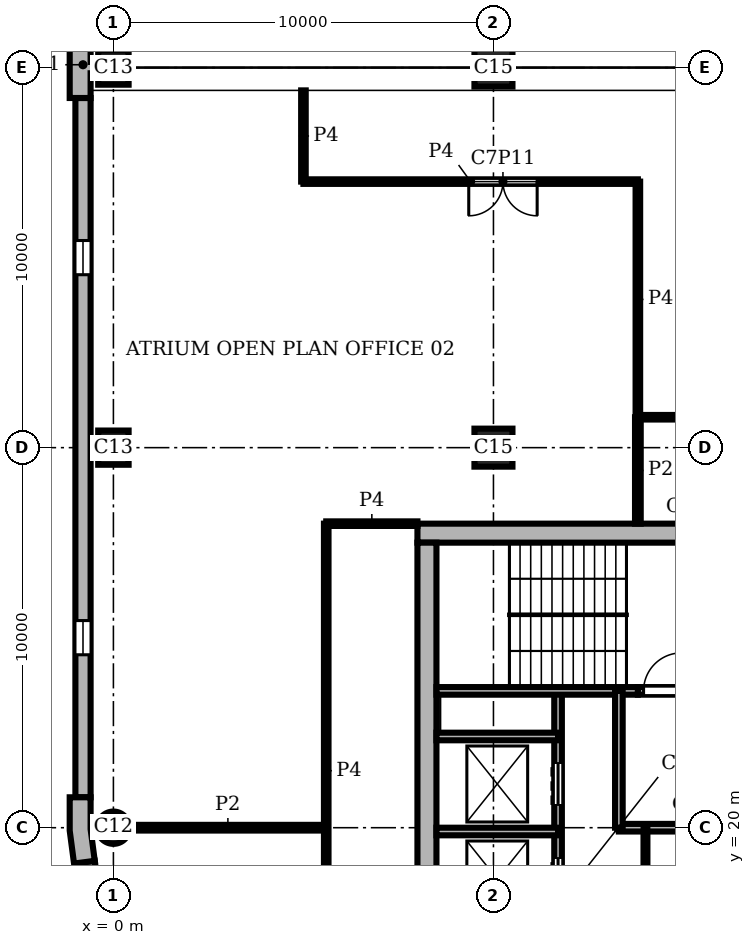
"""IFC4 building model, lengths in metres.
Left out: names, types, materials, properties, quantities, classifications, styles, units other than length and angle.
Written with IfcOpenShell. Run it as: python <this file> out.ifc"""

import sys

from ifc_helpers import new_model, si_unit, direction, frame, frame_2d, origin, origin_2d, place, context, subcontext, project, spatial, polyline, rectangle, circle, outline, extrude, element, fill, save


model = new_model("IFC4")
c1 = context("Model", 3, precision=1e-05, world=origin(), true_north=direction((0.0, 1.0)))
c2 = subcontext(c1, "Body", "Model", "MODEL_VIEW")
j1 = project(units=[si_unit("LENGTHUNIT", "METRE"), si_unit("PLANEANGLEUNIT", "RADIAN")], contexts=[c1])
p1 = place(None, origin())
s1 = spatial("IfcSite", under=j1, at=p1, CompositionType="ELEMENT")
p2 = place(p1, origin())
s2 = spatial("IfcBuilding", under=s1, at=p2, CompositionType="ELEMENT")
p3 = place(p2, frame((0.0, 0.0, 313.8)))
s3 = spatial("IfcBuildingStorey", under=s2, at=p3, CompositionType="ELEMENT", Elevation=313.8)
for number, where, z_axis, x_axis in (
    (1, (0.0, 40.0, 0.0), (0.0, 0.0, 1.0), (0.0, 1.0, 0.0)),
    (2, (0.0, 30.0, 0.0), (0.0, 0.0, 1.0), (0.0, 1.0, 0.0)),
):
    element("IfcColumn", number, at=place(p3, frame(where, z_axis=z_axis, x_axis=x_axis)), inside=s3, PredefinedType="COLUMN", context=c2, shape_type="SweptSolid", body=[
        extrude(rectangle(XDim=0.9, YDim=0.8, at=origin_2d()), origin(), (0.0, 0.0, 1.0), 3.9),
    ])
p4 = place(p3, frame((0.0, 20.0, 0.0), z_axis=(0.0, 0.0, 1.0), x_axis=(1.0, 0.0, 0.0)))
e3 = element("IfcColumn", 3, at=p4, inside=s3, PredefinedType="COLUMN", context=c2, shape_type="SweptSolid", body=[
    extrude(circle(Radius=0.425, at=origin_2d()), origin(), (0.0, 0.0, 1.0), 3.9),
])
for number, where, z_axis, x_axis in (
    (4, (10.0, 30.0, 0.0), (0.0, 0.0, 1.0), (1.0, 0.0, 0.0)),
    (5, (10.0, 40.0, 0.0), (0.0, 0.0, 1.0), (1.0, 0.0, 0.0)),
):
    element("IfcColumn", number, at=place(p3, frame(where, z_axis=z_axis, x_axis=x_axis)), inside=s3, PredefinedType="COLUMN", context=c2, shape_type="SweptSolid", body=[
        extrude(rectangle(XDim=1.0, YDim=1.0, at=origin_2d()), origin(), (0.0, 0.0, 1.0), 3.9),
    ])
p5 = place(p3, frame((28.0, 27.75, 0.0), z_axis=(0.0, 0.0, 1.0), x_axis=(-1.0, 0.0, 0.0)))
e6 = element("IfcWall", 6, at=p5, inside=s3, PredefinedType="SHEAR", context=c2, shape_type="SweptSolid", body=[
    extrude(rectangle(XDim=20.0, YDim=0.5, at=frame_2d((10.0, 0.0))), origin(), (0.0, 0.0, 1.0), 3.9),
])
p6 = place(p3, frame((8.25, 27.5, 0.0), z_axis=(0.0, 0.0, 1.0), x_axis=(0.0, -1.0, 0.0)))
e7 = element("IfcWall", 7, at=p6, inside=s3, PredefinedType="SHEAR", context=c2, shape_type="SweptSolid", body=[
    extrude(rectangle(XDim=19.0, YDim=0.5, at=frame_2d((9.5, 0.0))), origin(), (0.0, 0.0, 1.0), 3.9),
])
p7 = place(p3, origin())
e8 = element("IfcWall", 8, at=p7, inside=s3, PredefinedType="SOLIDWALL", context=c2, shape_type="SweptSolid", body=[
    extrude(outline(polyline([(-0.6, 39.2), (-0.6, 39.85), (-0.45, 39.85), (-0.45, 40.15), (-0.6, 40.15), (-0.6, 40.8), (-1.0, 40.8), (-1.15, 40.8), (-1.15, 40.0), (-1.15, 39.2), (-1.0, 39.2), (-0.6, 39.2)])), origin(), (0.0, 0.0, 1.0), 3.9),
])
e9 = element("IfcWall", 9, at=p7, inside=s3, PredefinedType="SOLIDWALL", context=c2, shape_type="SweptSolid", body=[
    extrude(outline(polyline([(-1.0, 20.8), (-1.15, 20.8), (-1.15, 19.925), (-1.036, 19.057), (-0.887, 19.076), (-0.49, 19.128), (-0.6, 19.961), (-0.6, 20.8), (-1.0, 20.8)])), origin(), (0.0, 0.0, 1.0), 3.9),
])
p8 = place(p3, frame((-0.8, 39.2, 0.0), z_axis=(0.0, 0.0, 1.0), x_axis=(0.0, -1.0, 0.0)))
e10 = element("IfcWall", 10, at=p8, inside=s3, PredefinedType="SOLIDWALL", context=c2, shape_type="SweptSolid", body=[
    extrude(rectangle(XDim=18.4, YDim=0.4, at=frame_2d((9.2, 0.0))), origin(), (0.0, 0.0, 1.0), 3.9),
])
p9 = place(p8, frame((3.75, 0.0, 0.9)))
e11 = element("IfcOpeningElement", 11, at=p9, cuts=e10, PredefinedType="OPENING", context=c2, shape_type="SweptSolid", body=[
    extrude(rectangle(XDim=0.9, YDim=2.35, at=frame_2d((0.45, 1.175))), frame((0.0, 0.21, 0.0), z_axis=(0.0, -1.0, 0.0), x_axis=(1.0, 0.0, 0.0)), (0.0, 0.0, 1.0), 0.42),
])
p10 = place(p8, frame((13.75, 0.0, 0.9)))
e12 = element("IfcOpeningElement", 12, at=p10, cuts=e10, PredefinedType="OPENING", context=c2, shape_type="SweptSolid", body=[
    extrude(rectangle(XDim=0.9, YDim=2.35, at=frame_2d((0.45, 1.175))), frame((0.0, 0.21, 0.0), z_axis=(0.0, -1.0, 0.0), x_axis=(1.0, 0.0, 0.0)), (0.0, 0.0, 1.0), 0.42),
])
p11 = place(p3, frame((-0.689, 19.102, 0.0), z_axis=(0.0, 0.0, 1.0), x_axis=(0.130514280502, -0.991446429508, 0.0)))
e13 = element("IfcWall", 13, at=p11, inside=s3, PredefinedType="SOLIDWALL", context=c2, shape_type="SweptSolid", body=[
    extrude(rectangle(XDim=4.121, YDim=0.4, at=frame_2d((2.061, 0.0))), origin(), (0.0, 0.0, 1.0), 3.9),
])
p12 = place(p11, frame((1.611, 0.0, 0.9)))
e14 = element("IfcOpeningElement", 14, at=p12, cuts=e13, PredefinedType="OPENING", context=c2, shape_type="SweptSolid", body=[
    extrude(rectangle(XDim=0.9, YDim=2.35, at=frame_2d((0.45, 1.175))), frame((0.0, 0.21, 0.0), z_axis=(0.0, -1.0, 0.0), x_axis=(1.0, 0.0, 0.0)), (0.0, 0.0, 1.0), 0.42),
])
p13 = place(p3, frame((8.5, 19.9, 0.0), z_axis=(0.0, 0.0, 1.0), x_axis=(1.0, 0.0, 0.0)))
e15 = element("IfcWall", 15, at=p13, inside=s3, PredefinedType="SHEAR", context=c2, shape_type="SweptSolid", body=[
    extrude(rectangle(XDim=3.2, YDim=0.2, at=frame_2d((1.6, 0.0))), origin(), (0.0, 0.0, 1.0), 3.58),
])
p14 = place(p3, frame((13.3, 20.0, 0.0), z_axis=(0.0, 0.0, 1.0), x_axis=(1.0, 0.0, 0.0)))
e16 = element("IfcWall", 16, at=p14, inside=s3, PredefinedType="SHEAR", context=c2, shape_type="SweptSolid", body=[
    extrude(rectangle(XDim=4.7, YDim=0.2, at=frame_2d((2.35, 0.0))), origin(), (0.0, 0.0, 1.0), 3.58),
])
p15 = place(p3, frame((8.5, 22.4, 0.0), z_axis=(0.0, 0.0, 1.0), x_axis=(1.0, 0.0, 0.0)))
e17 = element("IfcWall", 17, at=p15, inside=s3, PredefinedType="SHEAR", context=c2, shape_type="SweptSolid", body=[
    extrude(rectangle(XDim=3.2, YDim=0.2, at=frame_2d((1.6, 0.0))), origin(), (0.0, 0.0, 1.0), 3.58),
])
p16 = place(p3, frame((8.5, 23.6, 0.0), z_axis=(0.0, 0.0, 1.0), x_axis=(1.0, 0.0, 0.0)))
e18 = element("IfcWall", 18, at=p16, inside=s3, PredefinedType="SHEAR", context=c2, shape_type="SweptSolid", body=[
    extrude(rectangle(XDim=5.3, YDim=0.2, at=frame_2d((2.65, 0.0))), origin(), (0.0, 0.0, 1.0), 3.58),
])
p17 = place(p3, frame((13.8, 23.6, 0.0), z_axis=(0.0, 0.0, 1.0), x_axis=(1.0, 0.0, 0.0)))
e19 = element("IfcWall", 19, at=p17, inside=s3, PredefinedType="SHEAR", context=c2, shape_type="SweptSolid", body=[
    extrude(rectangle(XDim=13.7, YDim=0.2, at=frame_2d((6.85, 0.0))), origin(), (0.0, 0.0, 1.0), 3.58),
])
p18 = place(p17, frame((2.4, 0.0, 0.0)))
e20 = element("IfcOpeningElement", 20, at=p18, cuts=e19, PredefinedType="OPENING", context=c2, shape_type="SweptSolid", body=[
    extrude(rectangle(XDim=1.1, YDim=2.1, at=frame_2d((0.55, 1.05))), frame((0.0, 0.11, 0.0), z_axis=(0.0, -1.0, 0.0), x_axis=(1.0, 0.0, 0.0)), (0.0, 0.0, 1.0), 0.22),
])
p19 = place(p17, frame((4.9, 0.0, 0.0)))
e21 = element("IfcOpeningElement", 21, at=p19, cuts=e19, PredefinedType="OPENING", context=c2, shape_type="SweptSolid", body=[
    extrude(rectangle(XDim=1.1, YDim=2.1, at=frame_2d((0.55, 1.05))), frame((0.0, 0.11, 0.0), z_axis=(0.0, -1.0, 0.0), x_axis=(1.0, 0.0, 0.0)), (0.0, 0.0, 1.0), 0.22),
])
p20 = place(p17, frame((0.15, 0.0, 0.0)))
e22 = element("IfcOpeningElement", 22, at=p20, cuts=e19, PredefinedType="OPENING", context=c2, shape_type="SweptSolid", body=[
    extrude(rectangle(XDim=1.0, YDim=2.1, at=frame_2d((0.5, 1.05))), frame((0.0, 0.11, 0.0), z_axis=(0.0, -1.0, 0.0), x_axis=(1.0, 0.0, 0.0)), (0.0, 0.0, 1.0), 0.22),
])
p21 = place(p3, frame((11.7, 12.4, 0.0), z_axis=(0.0, 0.0, 1.0), x_axis=(0.0, 1.0, 0.0)))
e23 = element("IfcWall", 23, at=p21, inside=s3, PredefinedType="SHEAR", context=c2, shape_type="SweptSolid", body=[
    extrude(rectangle(XDim=11.2, YDim=0.2, at=frame_2d((5.6, 0.0))), origin(), (0.0, 0.0, 1.0), 3.58),
])
p22 = place(p21, frame((0.7, 0.0, 0.0)))
e24 = element("IfcOpeningElement", 24, at=p22, cuts=e23, PredefinedType="OPENING", context=c2, shape_type="SweptSolid", body=[
    extrude(rectangle(XDim=1.1, YDim=2.1, at=frame_2d((0.55, 1.05))), frame((0.0, 0.11, 0.0), z_axis=(0.0, -1.0, 0.0), x_axis=(1.0, 0.0, 0.0)), (0.0, 0.0, 1.0), 0.22),
])
p23 = place(p21, frame((3.2, 0.0, 0.0)))
e25 = element("IfcOpeningElement", 25, at=p23, cuts=e23, PredefinedType="OPENING", context=c2, shape_type="SweptSolid", body=[
    extrude(rectangle(XDim=1.1, YDim=2.1, at=frame_2d((0.55, 1.05))), frame((0.0, 0.11, 0.0), z_axis=(0.0, -1.0, 0.0), x_axis=(1.0, 0.0, 0.0)), (0.0, 0.0, 1.0), 0.22),
])
p24 = place(p21, frame((5.7, 0.0, 0.0)))
e26 = element("IfcOpeningElement", 26, at=p24, cuts=e23, PredefinedType="OPENING", context=c2, shape_type="SweptSolid", body=[
    extrude(rectangle(XDim=1.1, YDim=2.1, at=frame_2d((0.55, 1.05))), frame((0.0, 0.11, 0.0), z_axis=(0.0, -1.0, 0.0), x_axis=(1.0, 0.0, 0.0)), (0.0, 0.0, 1.0), 0.22),
])
p25 = place(p21, frame((8.2, 0.0, 0.0)))
e27 = element("IfcOpeningElement", 27, at=p25, cuts=e23, PredefinedType="OPENING", context=c2, shape_type="SweptSolid", body=[
    extrude(rectangle(XDim=1.1, YDim=2.1, at=frame_2d((0.55, 1.05))), frame((0.0, 0.11, 0.0), z_axis=(0.0, -1.0, 0.0), x_axis=(1.0, 0.0, 0.0)), (0.0, 0.0, 1.0), 0.22),
])
p26 = place(p3, frame((13.3, 20.0, 0.0), z_axis=(0.0, 0.0, 1.0), x_axis=(0.0, 1.0, 0.0)))
e28 = element("IfcWall", 28, at=p26, inside=s3, PredefinedType="SHEAR", context=c2, shape_type="SweptSolid", body=[
    extrude(rectangle(XDim=3.6, YDim=0.2, at=frame_2d((1.8, 0.0))), origin(), (0.0, 0.0, 1.0), 3.58),
])
p27 = place(p3, frame((14.0, 16.2, 0.0), z_axis=(0.0, 0.0, 1.0), x_axis=(0.0, 1.0, 0.0)))
e29 = element("IfcWall", 29, at=p27, inside=s3, PredefinedType="PARTITIONING", context=c2, shape_type="SweptSolid", body=[
    extrude(rectangle(XDim=3.8, YDim=0.1, at=frame_2d((1.9, 0.0))), origin(), (0.0, 0.0, 1.0), 3.58),
])
p28 = place(p3, frame((13.8, 28.0, 0.0), z_axis=(0.0, 0.0, 1.0), x_axis=(0.0, 1.0, 0.0)))
e30 = element("IfcWall", 30, at=p28, inside=s3, PredefinedType="PARTITIONING", context=c2, shape_type="SweptSolid", body=[
    extrude(rectangle(XDim=2.8, YDim=0.15, at=frame_2d((1.4, 0.0))), origin(), (0.0, 0.0, 1.0), 3.58),
])
p29 = place(p3, frame((0.425, 20.0, 0.0), z_axis=(0.0, 0.0, 1.0), x_axis=(1.0, 0.0, 0.0)))
e31 = element("IfcWall", 31, at=p29, inside=s3, PredefinedType="PARTITIONING", context=c2, shape_type="SweptSolid", body=[
    extrude(rectangle(XDim=5.175, YDim=0.15, at=frame_2d((2.587, 0.0))), origin(), (0.0, 0.0, 1.0), 3.58),
])
p30 = place(p3, frame((5.0, 37.0, 0.0), z_axis=(0.0, 0.0, 1.0), x_axis=(0.0, 1.0, 0.0)))
e32 = element("IfcWall", 32, at=p30, inside=s3, PredefinedType="PARTITIONING", context=c2, shape_type="SweptSolid", body=[
    extrude(rectangle(XDim=2.4, YDim=0.12, at=frame_2d((1.2, 0.0))), origin(), (0.0, 0.0, 1.0), 3.58),
])
p31 = place(p3, frame((5.6, 15.0, 0.0), z_axis=(0.0, 0.0, 1.0), x_axis=(0.0, 1.0, 0.0)))
e33 = element("IfcWall", 33, at=p31, inside=s3, PredefinedType="PARTITIONING", context=c2, shape_type="SweptSolid", body=[
    extrude(rectangle(XDim=13.0, YDim=0.12, at=frame_2d((6.5, 0.0))), origin(), (0.0, 0.0, 1.0), 3.58),
])
p32 = place(p31, frame((2.1, 0.0, 0.0)))
e34 = element("IfcOpeningElement", 34, at=p32, cuts=e33, PredefinedType="OPENING", context=c2, shape_type="SweptSolid", body=[
    extrude(rectangle(XDim=1.0, YDim=2.1, at=frame_2d((0.5, 1.05))), frame((0.0, 0.07, 0.0), z_axis=(0.0, -1.0, 0.0), x_axis=(1.0, 0.0, 0.0)), (0.0, 0.0, 1.0), 0.14),
])
p33 = place(p3, frame((13.8, 30.8, 0.0), z_axis=(0.0, 0.0, 1.0), x_axis=(0.0, 1.0, 0.0)))
e35 = element("IfcWall", 35, at=p33, inside=s3, PredefinedType="PARTITIONING", context=c2, shape_type="SweptSolid", body=[
    extrude(rectangle(XDim=6.2, YDim=0.12, at=frame_2d((3.1, 0.0))), origin(), (0.0, 0.0, 1.0), 3.58),
])
p34 = place(p3, frame((5.6, 28.0, 0.0), z_axis=(0.0, 0.0, 1.0), x_axis=(1.0, 0.0, 0.0)))
e36 = element("IfcWall", 36, at=p34, inside=s3, PredefinedType="PARTITIONING", context=c2, shape_type="SweptSolid", body=[
    extrude(rectangle(XDim=2.4, YDim=0.12, at=frame_2d((1.2, 0.0))), origin(), (0.0, 0.0, 1.0), 3.58),
])
p35 = place(p3, frame((13.802, 30.8, 0.0), z_axis=(0.0, 0.0, 1.0), x_axis=(1.0, 0.0, 0.0)))
e37 = element("IfcWall", 37, at=p35, inside=s3, PredefinedType="PARTITIONING", context=c2, shape_type="SweptSolid", body=[
    extrude(rectangle(XDim=16.797, YDim=0.12, at=frame_2d((8.398, 0.0))), origin(), (0.0, 0.0, 1.0), 3.58),
])
p36 = place(p35, frame((8.1, 0.0, 0.0)))
e38 = element("IfcOpeningElement", 38, at=p36, cuts=e37, PredefinedType="OPENING", context=c2, shape_type="SweptSolid", body=[
    extrude(rectangle(XDim=1.0, YDim=2.1, at=frame_2d((0.5, 1.05))), frame((0.0, 0.07, 0.0), z_axis=(0.0, -1.0, 0.0), x_axis=(1.0, 0.0, 0.0)), (0.0, 0.0, 1.0), 0.14),
])
p37 = place(p3, frame((5.0, 37.0, 0.0), z_axis=(0.0, 0.0, 1.0), x_axis=(1.0, 0.0, 0.0)))
e39 = element("IfcWall", 39, at=p37, inside=s3, PredefinedType="PARTITIONING", context=c2, shape_type="SweptSolid", body=[
    extrude(rectangle(XDim=8.8, YDim=0.12, at=frame_2d((4.4, 0.0))), origin(), (0.0, 0.0, 1.0), 3.58),
])
p38 = place(p37, frame((4.35, 0.0, 0.0)))
e40 = element("IfcOpeningElement", 40, at=p38, cuts=e39, PredefinedType="OPENING", context=c2, shape_type="SweptSolid", body=[
    extrude(rectangle(XDim=1.8, YDim=2.1, at=frame_2d((0.9, 1.05))), frame((0.0, 0.07, 0.0), z_axis=(0.0, -1.0, 0.0), x_axis=(1.0, 0.0, 0.0)), (0.0, 0.0, 1.0), 0.14),
])
p39 = place(p9, origin())
e41 = element("IfcWindow", 41, at=p39, inside=s3, PartitioningType="SINGLE_PANEL", PredefinedType="WINDOW", context=c2, shape_type="SweptSolid", body=[
    extrude(rectangle(XDim=0.9, YDim=2.35, at=frame_2d((0.45, 1.175))), frame((0.0, 0.16, 0.0), z_axis=(0.0, -1.0, 0.0), x_axis=(1.0, 0.0, 0.0)), (0.0, 0.0, 1.0), 0.06),
])
fill(e11, e41)
p40 = place(p10, origin())
e42 = element("IfcWindow", 42, at=p40, inside=s3, PartitioningType="SINGLE_PANEL", PredefinedType="WINDOW", context=c2, shape_type="SweptSolid", body=[
    extrude(rectangle(XDim=0.9, YDim=2.35, at=frame_2d((0.45, 1.175))), frame((0.0, 0.16, 0.0), z_axis=(0.0, -1.0, 0.0), x_axis=(1.0, 0.0, 0.0)), (0.0, 0.0, 1.0), 0.06),
])
fill(e12, e42)
p41 = place(p24, origin())
e43 = element("IfcDoor", 43, at=p41, inside=s3, OperationType="DOUBLE_DOOR_SLIDING", PredefinedType="DOOR", context=c2, shape_type="SweptSolid", body=[
    extrude(rectangle(XDim=1.1, YDim=2.1, at=frame_2d((0.55, 1.05))), frame((0.0, 0.025, 0.0), z_axis=(0.0, -1.0, 0.0), x_axis=(1.0, 0.0, 0.0)), (0.0, 0.0, 1.0), 0.05),
])
fill(e26, e43)
p42 = place(p25, origin())
e44 = element("IfcDoor", 44, at=p42, inside=s3, OperationType="DOUBLE_DOOR_SLIDING", PredefinedType="DOOR", context=c2, shape_type="SweptSolid", body=[
    extrude(rectangle(XDim=1.1, YDim=2.1, at=frame_2d((0.55, 1.05))), frame((0.0, 0.025, 0.0), z_axis=(0.0, -1.0, 0.0), x_axis=(1.0, 0.0, 0.0)), (0.0, 0.0, 1.0), 0.05),
])
fill(e27, e44)
p43 = place(p20, origin())
e45 = element("IfcDoor", 45, at=p43, inside=s3, OperationType="SINGLE_SWING_RIGHT", PredefinedType="DOOR", context=c2, shape_type="SweptSolid", body=[
    extrude(rectangle(XDim=1.0, YDim=2.1, at=frame_2d((0.5, 1.05))), frame((0.0, 0.025, 0.0), z_axis=(0.0, -1.0, 0.0), x_axis=(1.0, 0.0, 0.0)), (0.0, 0.0, 1.0), 0.05),
])
fill(e22, e45)
p44 = place(p38, frame((1.8, 0.0, 0.0), z_axis=(0.0, 0.0, 1.0), x_axis=(-1.0, 0.0, 0.0)))
e46 = element("IfcDoor", 46, at=p44, inside=s3, OperationType="DOUBLE_DOOR_SINGLE_SWING", PredefinedType="DOOR", context=c2, shape_type="SweptSolid", body=[
    extrude(rectangle(XDim=1.8, YDim=2.1, at=frame_2d((0.9, 1.05))), frame((0.0, 0.025, 0.0), z_axis=(0.0, -1.0, 0.0), x_axis=(1.0, 0.0, 0.0)), (0.0, 0.0, 1.0), 0.05),
])
fill(e40, e46)
save(model, sys.argv[1])
